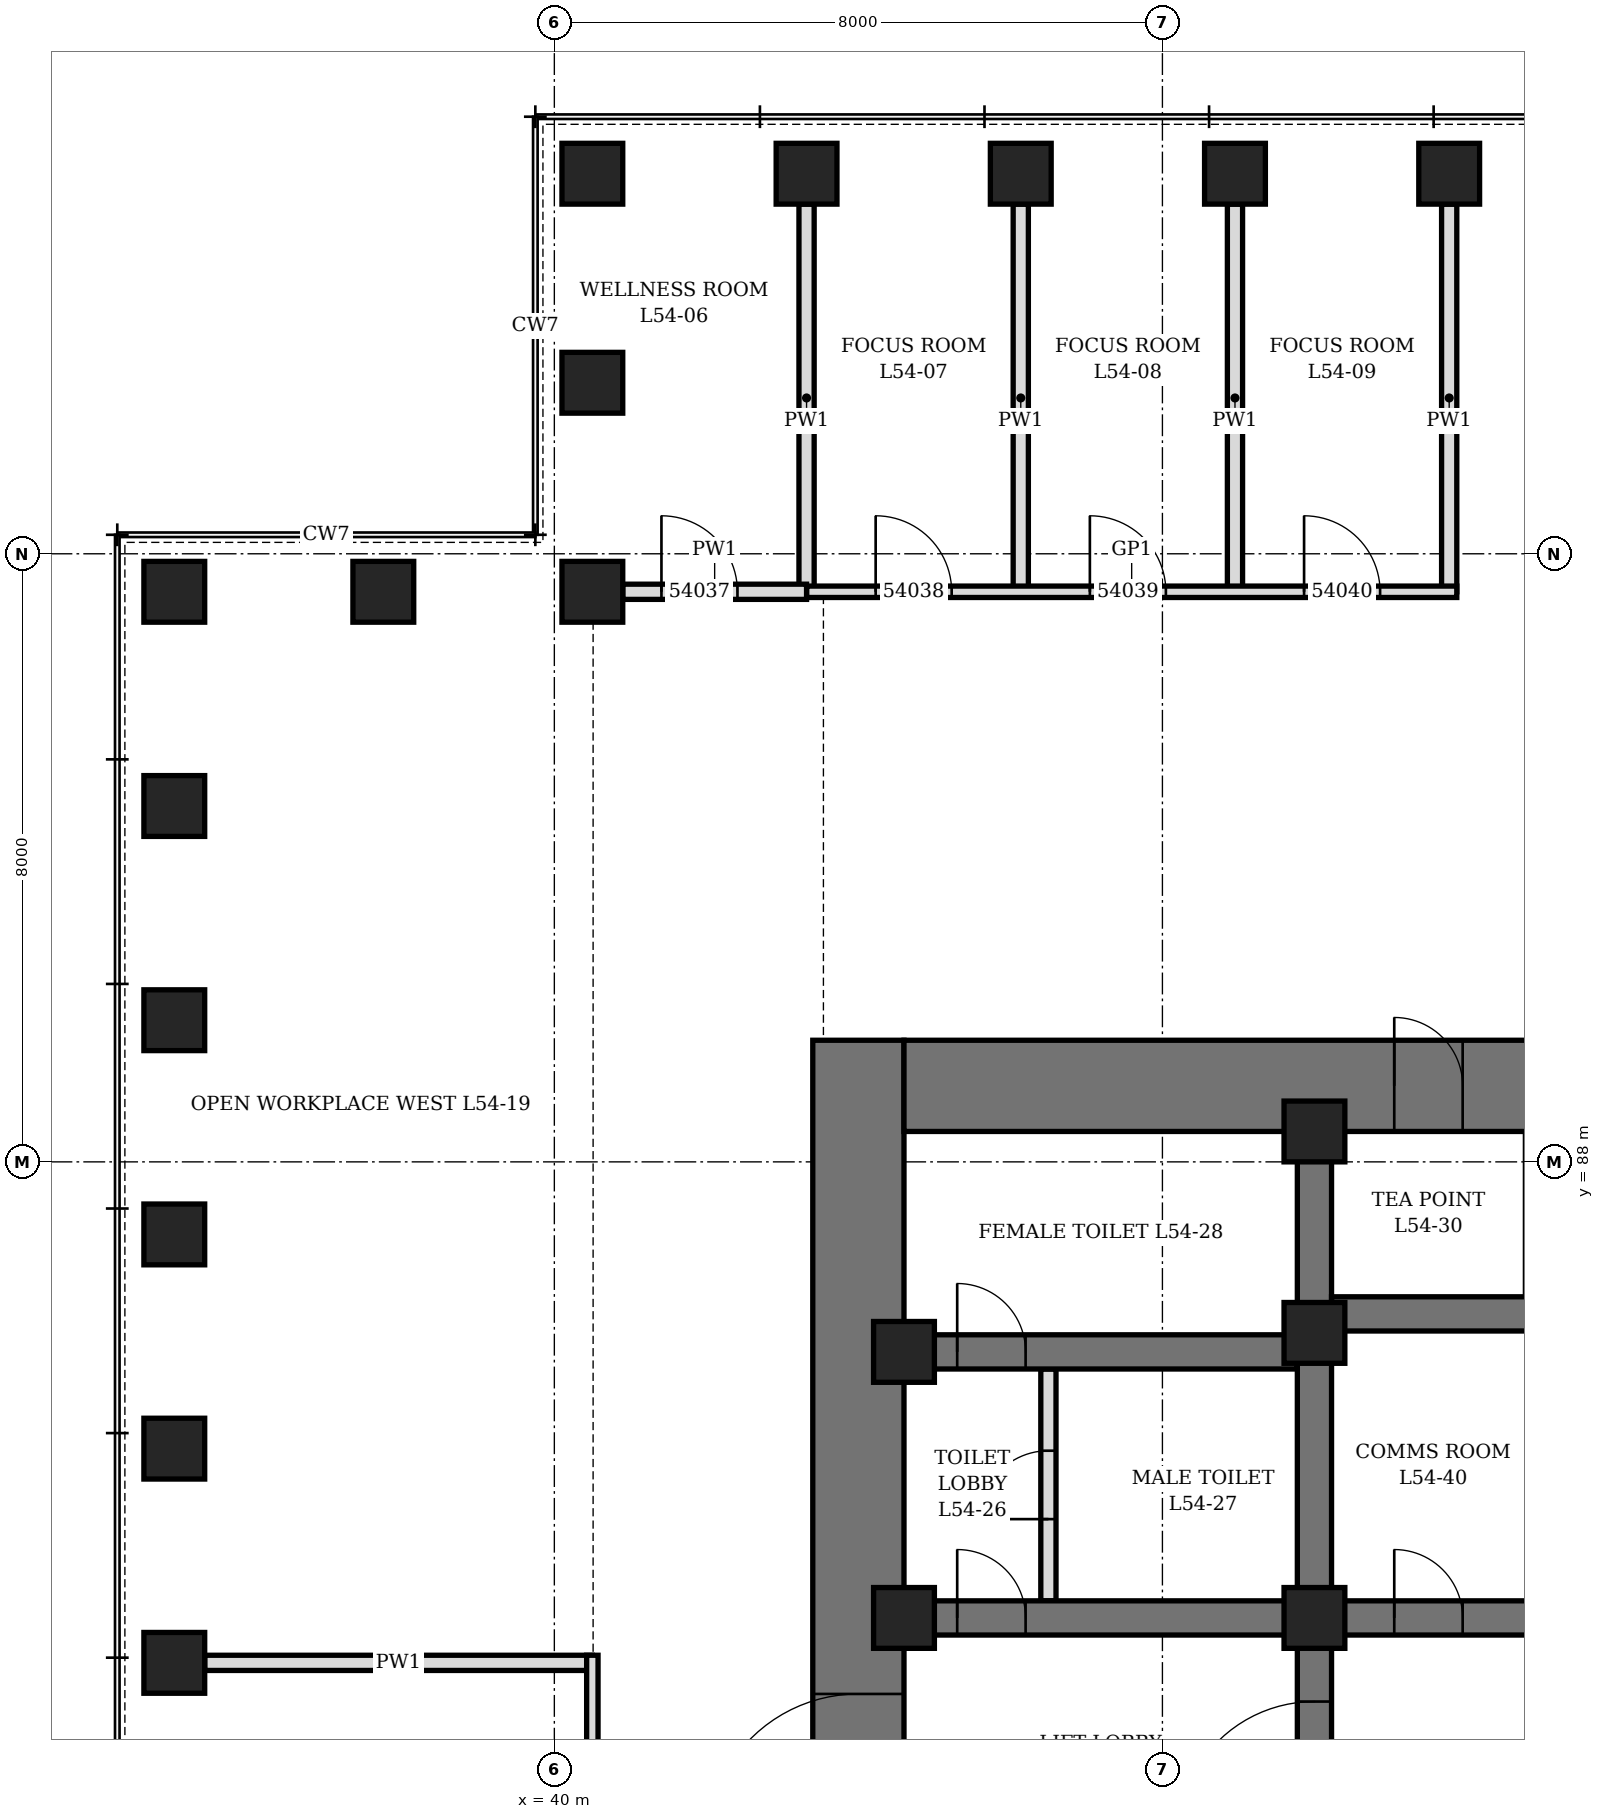
"""IFC4 building model, lengths in metres.
Left out: names, types, materials, properties, quantities, classifications, styles, units other than length and angle.
Written with IfcOpenShell. Run it as: python <this file> out.ifc"""

import sys

from ifc_helpers import new_model, si_unit, direction, frame, frame_2d, origin, origin_2d, place, context, subcontext, project, spatial, rectangle, hollow_rectangle, extrude, element, fill, save


model = new_model("IFC4")
c1 = context("Model", 3, precision=1e-05, world=origin(), true_north=direction((0.0, 1.0)))
c2 = subcontext(c1, "Body", "Model", "MODEL_VIEW")
j1 = project(units=[si_unit("LENGTHUNIT", "METRE"), si_unit("PLANEANGLEUNIT", "RADIAN")], contexts=[c1])
p1 = place(None, origin())
s1 = spatial("IfcSite", under=j1, at=p1, CompositionType="ELEMENT")
p2 = place(p1, origin())
s2 = spatial("IfcBuilding", under=s1, at=p2, CompositionType="ELEMENT")
p3 = place(p2, frame((0.0, 0.0, 240.1)))
s3 = spatial("IfcBuildingStorey", under=s2, at=p3, CompositionType="ELEMENT", Elevation=240.1)
for number, where, z_axis, x_axis in (
    (1, (51.773, 101.0, 0.0), (0.0, 0.0, 1.0), (1.0, 0.0, 0.0)),
    (2, (48.955, 101.0, 0.0), (0.0, 0.0, 1.0), (1.0, 0.0, 0.0)),
    (3, (46.136, 101.0, 0.0), (0.0, 0.0, 1.0), (1.0, 0.0, 0.0)),
    (4, (43.318, 101.0, 0.0), (0.0, 0.0, 1.0), (1.0, 0.0, 0.0)),
    (5, (40.5, 101.0, 0.0), (0.0, 0.0, 1.0), (0.0, 1.0, 0.0)),
    (6, (40.5, 98.25, 0.0), (0.0, 0.0, 1.0), (0.0, 1.0, 0.0)),
    (7, (40.5, 95.5, 0.0), (0.0, 0.0, 1.0), (1.0, 0.0, 0.0)),
    (8, (37.75, 95.5, 0.0), (0.0, 0.0, 1.0), (1.0, 0.0, 0.0)),
    (9, (35.0, 95.5, 0.0), (0.0, 0.0, 1.0), (0.0, 1.0, 0.0)),
    (10, (35.0, 92.682, 0.0), (0.0, 0.0, 1.0), (0.0, 1.0, 0.0)),
    (11, (35.0, 89.864, 0.0), (0.0, 0.0, 1.0), (0.0, 1.0, 0.0)),
    (12, (35.0, 87.045, 0.0), (0.0, 0.0, 1.0), (0.0, 1.0, 0.0)),
    (13, (35.0, 84.227, 0.0), (0.0, 0.0, 1.0), (0.0, 1.0, 0.0)),
    (14, (35.0, 81.409, 0.0), (0.0, 0.0, 1.0), (0.0, 1.0, 0.0)),
):
    element("IfcColumn", number, at=place(p3, frame(where, z_axis=z_axis, x_axis=x_axis)), inside=s3, PredefinedType="COLUMN", context=c2, shape_type="SweptSolid", body=[
        extrude(hollow_rectangle(XDim=0.8, YDim=0.8, WallThickness=0.08, at=origin_2d()), origin(), (0.0, 0.0, 1.0), 4.2),
    ])
p4 = place(p3, frame((44.0, 70.4, 0.0), z_axis=(0.0, 0.0, 1.0), x_axis=(0.0, 1.0, 0.0)))
e15 = element("IfcWall", 15, at=p4, inside=s3, PredefinedType="SHEAR", context=c2, shape_type="SweptSolid", body=[
    extrude(rectangle(XDim=19.2, YDim=1.2, at=frame_2d((9.6, 0.0))), origin(), (0.0, 0.0, 1.0), 4.2),
])
p5 = place(p4, frame((8.6, 0.0, 0.0)))
e16 = element("IfcOpeningElement", 16, at=p5, cuts=e15, PredefinedType="OPENING", context=c2, shape_type="SweptSolid", body=[
    extrude(rectangle(XDim=2.0, YDim=2.4, at=frame_2d((1.0, 1.2))), frame((0.0, 0.61, 0.0), z_axis=(0.0, -1.0, 0.0), x_axis=(1.0, 0.0, 0.0)), (0.0, 0.0, 1.0), 1.22),
])
p6 = place(p3, frame((44.6, 89.0, 0.0), z_axis=(0.0, 0.0, 1.0), x_axis=(1.0, 0.0, 0.0)))
e17 = element("IfcWall", 17, at=p6, inside=s3, PredefinedType="SHEAR", context=c2, shape_type="SweptSolid", body=[
    extrude(rectangle(XDim=22.8, YDim=1.2, at=frame_2d((11.4, 0.0))), origin(), (0.0, 0.0, 1.0), 4.2),
])
p7 = place(p6, frame((9.275, 0.0, 0.0)))
e18 = element("IfcOpeningElement", 18, at=p7, cuts=e17, PredefinedType="OPENING", context=c2, shape_type="SweptSolid", body=[
    extrude(rectangle(XDim=1.0, YDim=2.1, at=frame_2d((0.5, 1.05))), frame((0.0, 0.61, 0.0), z_axis=(0.0, -1.0, 0.0), x_axis=(1.0, 0.0, 0.0)), (0.0, 0.0, 1.0), 1.22),
])
p8 = place(p6, frame((6.45, 0.0, 0.0)))
e19 = element("IfcOpeningElement", 19, at=p8, cuts=e17, PredefinedType="OPENING", context=c2, shape_type="SweptSolid", body=[
    extrude(rectangle(XDim=0.9, YDim=2.1, at=frame_2d((0.45, 1.05))), frame((0.0, 0.61, 0.0), z_axis=(0.0, -1.0, 0.0), x_axis=(1.0, 0.0, 0.0)), (0.0, 0.0, 1.0), 1.22),
])
p9 = place(p6, frame((13.012, 0.0, 0.0)))
e20 = element("IfcOpeningElement", 20, at=p9, cuts=e17, PredefinedType="OPENING", context=c2, shape_type="SweptSolid", body=[
    extrude(rectangle(XDim=0.9, YDim=2.1, at=frame_2d((0.45, 1.05))), frame((0.0, 0.61, 0.0), z_axis=(0.0, -1.0, 0.0), x_axis=(1.0, 0.0, 0.0)), (0.0, 0.0, 1.0), 1.22),
])
p10 = place(p3, frame((50.0, 71.6, 0.0), z_axis=(0.0, 0.0, 1.0), x_axis=(0.0, 1.0, 0.0)))
e21 = element("IfcWall", 21, at=p10, inside=s3, PredefinedType="SHEAR", context=c2, shape_type="SweptSolid", body=[
    extrude(rectangle(XDim=16.8, YDim=0.45, at=frame_2d((8.4, 0.0))), origin(), (0.0, 0.0, 1.0), 4.2),
])
p11 = place(p10, frame((7.5, 0.0, 0.0)))
e22 = element("IfcOpeningElement", 22, at=p11, cuts=e21, PredefinedType="OPENING", context=c2, shape_type="SweptSolid", body=[
    extrude(rectangle(XDim=1.8, YDim=2.4, at=frame_2d((0.9, 1.2))), frame((0.0, 0.235, 0.0), z_axis=(0.0, -1.0, 0.0), x_axis=(1.0, 0.0, 0.0)), (0.0, 0.0, 1.0), 0.47),
])
p12 = place(p3, frame((44.6, 82.0, 0.0), z_axis=(0.0, 0.0, 1.0), x_axis=(1.0, 0.0, 0.0)))
e23 = element("IfcWall", 23, at=p12, inside=s3, PredefinedType="SHEAR", context=c2, shape_type="SweptSolid", body=[
    extrude(rectangle(XDim=5.175, YDim=0.45, at=frame_2d((2.587, 0.0))), origin(), (0.0, 0.0, 1.0), 4.2),
])
p13 = place(p12, frame((0.7, 0.0, 0.0)))
e24 = element("IfcOpeningElement", 24, at=p13, cuts=e23, PredefinedType="OPENING", context=c2, shape_type="SweptSolid", body=[
    extrude(rectangle(XDim=0.9, YDim=2.1, at=frame_2d((0.45, 1.05))), frame((0.0, 0.235, 0.0), z_axis=(0.0, -1.0, 0.0), x_axis=(1.0, 0.0, 0.0)), (0.0, 0.0, 1.0), 0.47),
])
p14 = place(p3, frame((44.6, 85.5, 0.0), z_axis=(0.0, 0.0, 1.0), x_axis=(1.0, 0.0, 0.0)))
e25 = element("IfcWall", 25, at=p14, inside=s3, PredefinedType="SHEAR", context=c2, shape_type="SweptSolid", body=[
    extrude(rectangle(XDim=5.175, YDim=0.45, at=frame_2d((2.587, 0.0))), origin(), (0.0, 0.0, 1.0), 4.2),
])
p15 = place(p14, frame((0.7, 0.0, 0.0)))
e26 = element("IfcOpeningElement", 26, at=p15, cuts=e25, PredefinedType="OPENING", context=c2, shape_type="SweptSolid", body=[
    extrude(rectangle(XDim=0.9, YDim=2.1, at=frame_2d((0.45, 1.05))), frame((0.0, 0.235, 0.0), z_axis=(0.0, -1.0, 0.0), x_axis=(1.0, 0.0, 0.0)), (0.0, 0.0, 1.0), 0.47),
])
p16 = place(p3, frame((50.225, 82.0, 0.0), z_axis=(0.0, 0.0, 1.0), x_axis=(1.0, 0.0, 0.0)))
e27 = element("IfcWall", 27, at=p16, inside=s3, PredefinedType="SHEAR", context=c2, shape_type="SweptSolid", body=[
    extrude(rectangle(XDim=11.55, YDim=0.45, at=frame_2d((5.775, 0.0))), origin(), (0.0, 0.0, 1.0), 4.2),
])
p17 = place(p16, frame((0.825, 0.0, 0.0)))
e28 = element("IfcOpeningElement", 28, at=p17, cuts=e27, PredefinedType="OPENING", context=c2, shape_type="SweptSolid", body=[
    extrude(rectangle(XDim=0.9, YDim=2.1, at=frame_2d((0.45, 1.05))), frame((0.0, 0.235, 0.0), z_axis=(0.0, -1.0, 0.0), x_axis=(1.0, 0.0, 0.0)), (0.0, 0.0, 1.0), 0.47),
])
p18 = place(p16, frame((3.825, 0.0, 0.0)))
e29 = element("IfcOpeningElement", 29, at=p18, cuts=e27, PredefinedType="OPENING", context=c2, shape_type="SweptSolid", body=[
    extrude(rectangle(XDim=0.9, YDim=2.1, at=frame_2d((0.45, 1.05))), frame((0.0, 0.235, 0.0), z_axis=(0.0, -1.0, 0.0), x_axis=(1.0, 0.0, 0.0)), (0.0, 0.0, 1.0), 0.47),
])
p19 = place(p16, frame((6.825, 0.0, 0.0)))
e30 = element("IfcOpeningElement", 30, at=p19, cuts=e27, PredefinedType="OPENING", context=c2, shape_type="SweptSolid", body=[
    extrude(rectangle(XDim=0.9, YDim=2.1, at=frame_2d((0.45, 1.05))), frame((0.0, 0.235, 0.0), z_axis=(0.0, -1.0, 0.0), x_axis=(1.0, 0.0, 0.0)), (0.0, 0.0, 1.0), 0.47),
])
p20 = place(p16, frame((9.825, 0.0, 0.0)))
e31 = element("IfcOpeningElement", 31, at=p20, cuts=e27, PredefinedType="OPENING", context=c2, shape_type="SweptSolid", body=[
    extrude(rectangle(XDim=0.9, YDim=2.1, at=frame_2d((0.45, 1.05))), frame((0.0, 0.235, 0.0), z_axis=(0.0, -1.0, 0.0), x_axis=(1.0, 0.0, 0.0)), (0.0, 0.0, 1.0), 0.47),
])
p21 = place(p3, frame((50.225, 86.0, 0.0), z_axis=(0.0, 0.0, 1.0), x_axis=(1.0, 0.0, 0.0)))
e32 = element("IfcWall", 32, at=p21, inside=s3, PredefinedType="SHEAR", context=c2, shape_type="SweptSolid", body=[
    extrude(rectangle(XDim=11.55, YDim=0.45, at=frame_2d((5.775, 0.0))), origin(), (0.0, 0.0, 1.0), 4.2),
])
for number, where, z_axis, x_axis in (
    (33, (44.6, 82.0, 0.0), (0.0, 0.0, 1.0), (1.0, 0.0, 0.0)),
    (34, (44.6, 85.5, 0.0), (0.0, 0.0, 1.0), (1.0, 0.0, 0.0)),
    (35, (50.0, 82.0, 0.0), (0.0, 0.0, 1.0), (1.0, 0.0, 0.0)),
    (36, (50.0, 85.75, 0.0), (0.0, 0.0, 1.0), (1.0, 0.0, 0.0)),
    (37, (50.0, 88.4, 0.0), (0.0, 0.0, 1.0), (1.0, 0.0, 0.0)),
):
    element("IfcColumn", number, at=place(p3, frame(where, z_axis=z_axis, x_axis=x_axis)), inside=s3, PredefinedType="COLUMN", context=c2, shape_type="SweptSolid", body=[
        extrude(hollow_rectangle(XDim=0.8, YDim=0.8, WallThickness=0.1, at=origin_2d()), origin(), (0.0, 0.0, 1.0), 4.2),
    ])
p22 = place(p3, frame((46.5, 82.225, 0.0), z_axis=(0.0, 0.0, 1.0), x_axis=(0.0, 1.0, 0.0)))
e38 = element("IfcWall", 38, at=p22, inside=s3, PredefinedType="PARTITIONING", context=c2, shape_type="SweptSolid", body=[
    extrude(rectangle(XDim=3.05, YDim=0.2, at=frame_2d((1.525, 0.0))), origin(), (0.0, 0.0, 1.0), 3.95),
])
p23 = place(p22, frame((1.075, 0.0, 0.0)))
e39 = element("IfcOpeningElement", 39, at=p23, cuts=e38, PredefinedType="OPENING", context=c2, shape_type="SweptSolid", body=[
    extrude(rectangle(XDim=0.9, YDim=2.1, at=frame_2d((0.45, 1.05))), frame((0.0, 0.11, 0.0), z_axis=(0.0, -1.0, 0.0), x_axis=(1.0, 0.0, 0.0)), (0.0, 0.0, 1.0), 0.22),
])
for number, where, z_axis, x_axis in (
    (40, (43.318, 95.5, 0.0), (0.0, 0.0, 1.0), (0.0, 1.0, 0.0)),
    (41, (46.136, 95.5, 0.0), (0.0, 0.0, 1.0), (0.0, 1.0, 0.0)),
    (42, (48.955, 95.5, 0.0), (0.0, 0.0, 1.0), (0.0, 1.0, 0.0)),
    (43, (51.773, 95.5, 0.0), (0.0, 0.0, 1.0), (0.0, 1.0, 0.0)),
    (44, (35.4, 81.409, 0.0), (0.0, 0.0, 1.0), (1.0, 0.0, 0.0)),
):
    element("IfcWall", number, at=place(p3, frame(where, z_axis=z_axis, x_axis=x_axis)), inside=s3, PredefinedType="PARTITIONING", context=c2, shape_type="SweptSolid", body=[
        extrude(rectangle(XDim=5.1, YDim=0.2, at=frame_2d((2.55, 0.0))), origin(), (0.0, 0.0, 1.0), 3.188),
    ])
p24 = place(p3, frame((43.318, 95.5, 0.0), z_axis=(0.0, 0.0, 1.0), x_axis=(1.0, 0.0, 0.0)))
e45 = element("IfcWall", 45, at=p24, inside=s3, PredefinedType="PARTITIONING", context=c2, shape_type="SweptSolid", body=[
    extrude(rectangle(XDim=8.555, YDim=0.15, at=frame_2d((4.277, 0.0))), origin(), (0.0, 0.0, 1.0), 3.95),
])
p25 = place(p24, frame((0.909, 0.0, 0.0)))
e46 = element("IfcOpeningElement", 46, at=p25, cuts=e45, PredefinedType="OPENING", context=c2, shape_type="SweptSolid", body=[
    extrude(rectangle(XDim=1.0, YDim=2.4, at=frame_2d((0.5, 1.2))), frame((0.0, 0.085, 0.0), z_axis=(0.0, -1.0, 0.0), x_axis=(1.0, 0.0, 0.0)), (0.0, 0.0, 1.0), 0.17),
])
p26 = place(p24, frame((3.727, 0.0, 0.0)))
e47 = element("IfcOpeningElement", 47, at=p26, cuts=e45, PredefinedType="OPENING", context=c2, shape_type="SweptSolid", body=[
    extrude(rectangle(XDim=1.0, YDim=2.4, at=frame_2d((0.5, 1.2))), frame((0.0, 0.085, 0.0), z_axis=(0.0, -1.0, 0.0), x_axis=(1.0, 0.0, 0.0)), (0.0, 0.0, 1.0), 0.17),
])
p27 = place(p24, frame((6.545, 0.0, 0.0)))
e48 = element("IfcOpeningElement", 48, at=p27, cuts=e45, PredefinedType="OPENING", context=c2, shape_type="SweptSolid", body=[
    extrude(rectangle(XDim=1.0, YDim=2.4, at=frame_2d((0.5, 1.2))), frame((0.0, 0.085, 0.0), z_axis=(0.0, -1.0, 0.0), x_axis=(1.0, 0.0, 0.0)), (0.0, 0.0, 1.0), 0.17),
])
p28 = place(p3, frame((40.9, 95.5, 0.0), z_axis=(0.0, 0.0, 1.0), x_axis=(1.0, 0.0, 0.0)))
e49 = element("IfcWall", 49, at=p28, inside=s3, PredefinedType="PARTITIONING", context=c2, shape_type="SweptSolid", body=[
    extrude(rectangle(XDim=2.418, YDim=0.2, at=frame_2d((1.209, 0.0))), origin(), (0.0, 0.0, 1.0), 3.95),
])
p29 = place(p28, frame((0.509, 0.0, 0.0)))
e50 = element("IfcOpeningElement", 50, at=p29, cuts=e49, PredefinedType="OPENING", context=c2, shape_type="SweptSolid", body=[
    extrude(rectangle(XDim=1.0, YDim=2.1, at=frame_2d((0.5, 1.05))), frame((0.0, 0.11, 0.0), z_axis=(0.0, -1.0, 0.0), x_axis=(1.0, 0.0, 0.0)), (0.0, 0.0, 1.0), 0.22),
])
p30 = place(p3, frame((40.5, 64.9, 0.0), z_axis=(0.0, 0.0, 1.0), x_axis=(0.0, 1.0, 0.0)))
e51 = element("IfcWall", 51, at=p30, inside=s3, PredefinedType="PARTITIONING", context=c2, shape_type="SweptSolid", body=[
    extrude(rectangle(XDim=16.609, YDim=0.15, at=frame_2d((8.305, 0.0))), origin(), (0.0, 0.0, 1.0), 3.95),
])
p31 = place(p30, frame((0.509, 0.0, 0.0)))
e52 = element("IfcOpeningElement", 52, at=p31, cuts=e51, PredefinedType="OPENING", context=c2, shape_type="SweptSolid", body=[
    extrude(rectangle(XDim=1.0, YDim=2.4, at=frame_2d((0.5, 1.2))), frame((0.0, 0.085, 0.0), z_axis=(0.0, -1.0, 0.0), x_axis=(1.0, 0.0, 0.0)), (0.0, 0.0, 1.0), 0.17),
])
p32 = place(p30, frame((6.146, 0.0, 0.0)))
e53 = element("IfcOpeningElement", 53, at=p32, cuts=e51, PredefinedType="OPENING", context=c2, shape_type="SweptSolid", body=[
    extrude(rectangle(XDim=1.0, YDim=2.1, at=frame_2d((0.5, 1.05))), frame((0.0, 0.085, 0.0), z_axis=(0.0, -1.0, 0.0), x_axis=(1.0, 0.0, 0.0)), (0.0, 0.0, 1.0), 0.17),
])
p33 = place(p30, frame((11.782, 0.0, 0.0)))
e54 = element("IfcOpeningElement", 54, at=p33, cuts=e51, PredefinedType="OPENING", context=c2, shape_type="SweptSolid", body=[
    extrude(rectangle(XDim=1.0, YDim=2.1, at=frame_2d((0.5, 1.05))), frame((0.0, 0.085, 0.0), z_axis=(0.0, -1.0, 0.0), x_axis=(1.0, 0.0, 0.0)), (0.0, 0.0, 1.0), 0.17),
])
p34 = place(p13, origin())
e55 = element("IfcDoor", 55, at=p34, inside=s3, OperationType="SINGLE_SWING_LEFT", PredefinedType="DOOR", context=c2, shape_type="SweptSolid", body=[
    extrude(rectangle(XDim=0.9, YDim=2.1, at=frame_2d((0.45, 1.05))), frame((0.0, 0.225, 0.0), z_axis=(0.0, -1.0, 0.0), x_axis=(1.0, 0.0, 0.0)), (0.0, 0.0, 1.0), 0.449),
])
fill(e24, e55)
p35 = place(p23, origin())
e56 = element("IfcDoor", 56, at=p35, inside=s3, OperationType="SINGLE_SWING_RIGHT", PredefinedType="DOOR", context=c2, shape_type="SweptSolid", body=[
    extrude(rectangle(XDim=0.9, YDim=2.1, at=frame_2d((0.45, 1.05))), frame((0.0, 0.1, 0.0), z_axis=(0.0, -1.0, 0.0), x_axis=(1.0, 0.0, 0.0)), (0.0, 0.0, 1.0), 0.199),
])
fill(e39, e56)
p36 = place(p15, origin())
e57 = element("IfcDoor", 57, at=p36, inside=s3, OperationType="SINGLE_SWING_RIGHT", PredefinedType="DOOR", context=c2, shape_type="SweptSolid", body=[
    extrude(rectangle(XDim=0.9, YDim=2.1, at=frame_2d((0.45, 1.05))), frame((0.0, 0.225, 0.0), z_axis=(0.0, -1.0, 0.0), x_axis=(1.0, 0.0, 0.0)), (0.0, 0.0, 1.0), 0.449),
])
fill(e26, e57)
p37 = place(p8, origin())
e58 = element("IfcDoor", 58, at=p37, inside=s3, OperationType="SINGLE_SWING_LEFT", PredefinedType="DOOR", context=c2, shape_type="SweptSolid", body=[
    extrude(rectangle(XDim=0.9, YDim=2.1, at=frame_2d((0.45, 1.05))), frame((0.0, 0.35, 0.0), z_axis=(0.0, -1.0, 0.0), x_axis=(1.0, 0.0, 0.0)), (0.0, 0.0, 1.0), 0.7),
])
fill(e19, e58)
p38 = place(p17, origin())
e59 = element("IfcDoor", 59, at=p38, inside=s3, OperationType="SINGLE_SWING_LEFT", PredefinedType="DOOR", context=c2, shape_type="SweptSolid", body=[
    extrude(rectangle(XDim=0.9, YDim=2.1, at=frame_2d((0.45, 1.05))), frame((0.0, 0.225, 0.0), z_axis=(0.0, -1.0, 0.0), x_axis=(1.0, 0.0, 0.0)), (0.0, 0.0, 1.0), 0.449),
])
fill(e28, e59)
p39 = place(p5, origin())
e60 = element("IfcDoor", 60, at=p39, inside=s3, OperationType="DOUBLE_DOOR_SINGLE_SWING", PredefinedType="DOOR", context=c2, shape_type="SweptSolid", body=[
    extrude(rectangle(XDim=2.0, YDim=2.4, at=frame_2d((1.0, 1.2))), frame((0.0, 0.35, 0.0), z_axis=(0.0, -1.0, 0.0), x_axis=(1.0, 0.0, 0.0)), (0.0, 0.0, 1.0), 0.7),
])
fill(e16, e60)
p40 = place(p11, origin())
e61 = element("IfcDoor", 61, at=p40, inside=s3, OperationType="DOUBLE_DOOR_SINGLE_SWING", PredefinedType="DOOR", context=c2, shape_type="SweptSolid", body=[
    extrude(rectangle(XDim=1.8, YDim=2.4, at=frame_2d((0.9, 1.2))), frame((0.0, 0.225, 0.0), z_axis=(0.0, -1.0, 0.0), x_axis=(1.0, 0.0, 0.0)), (0.0, 0.0, 1.0), 0.449),
])
fill(e22, e61)
p41 = place(p29, origin())
e62 = element("IfcDoor", 62, at=p41, inside=s3, OperationType="SINGLE_SWING_LEFT", PredefinedType="DOOR", context=c2, shape_type="SweptSolid", body=[
    extrude(rectangle(XDim=1.0, YDim=2.1, at=frame_2d((0.5, 1.05))), frame((0.0, 0.1, 0.0), z_axis=(0.0, -1.0, 0.0), x_axis=(1.0, 0.0, 0.0)), (0.0, 0.0, 1.0), 0.199),
])
fill(e50, e62)
p42 = place(p25, origin())
e63 = element("IfcDoor", 63, at=p42, inside=s3, OperationType="SINGLE_SWING_RIGHT", PredefinedType="DOOR", context=c2, shape_type="SweptSolid", body=[
    extrude(rectangle(XDim=1.0, YDim=2.4, at=frame_2d((0.5, 1.2))), frame((0.0, 0.075, 0.0), z_axis=(0.0, -1.0, 0.0), x_axis=(1.0, 0.0, 0.0)), (0.0, 0.0, 1.0), 0.149),
])
fill(e46, e63)
p43 = place(p26, origin())
e64 = element("IfcDoor", 64, at=p43, inside=s3, OperationType="SINGLE_SWING_RIGHT", PredefinedType="DOOR", context=c2, shape_type="SweptSolid", body=[
    extrude(rectangle(XDim=1.0, YDim=2.4, at=frame_2d((0.5, 1.2))), frame((0.0, 0.075, 0.0), z_axis=(0.0, -1.0, 0.0), x_axis=(1.0, 0.0, 0.0)), (0.0, 0.0, 1.0), 0.149),
])
fill(e47, e64)
p44 = place(p27, origin())
e65 = element("IfcDoor", 65, at=p44, inside=s3, OperationType="SINGLE_SWING_RIGHT", PredefinedType="DOOR", context=c2, shape_type="SweptSolid", body=[
    extrude(rectangle(XDim=1.0, YDim=2.4, at=frame_2d((0.5, 1.2))), frame((0.0, 0.075, 0.0), z_axis=(0.0, -1.0, 0.0), x_axis=(1.0, 0.0, 0.0)), (0.0, 0.0, 1.0), 0.149),
])
fill(e48, e65)
save(model, sys.argv[1])
